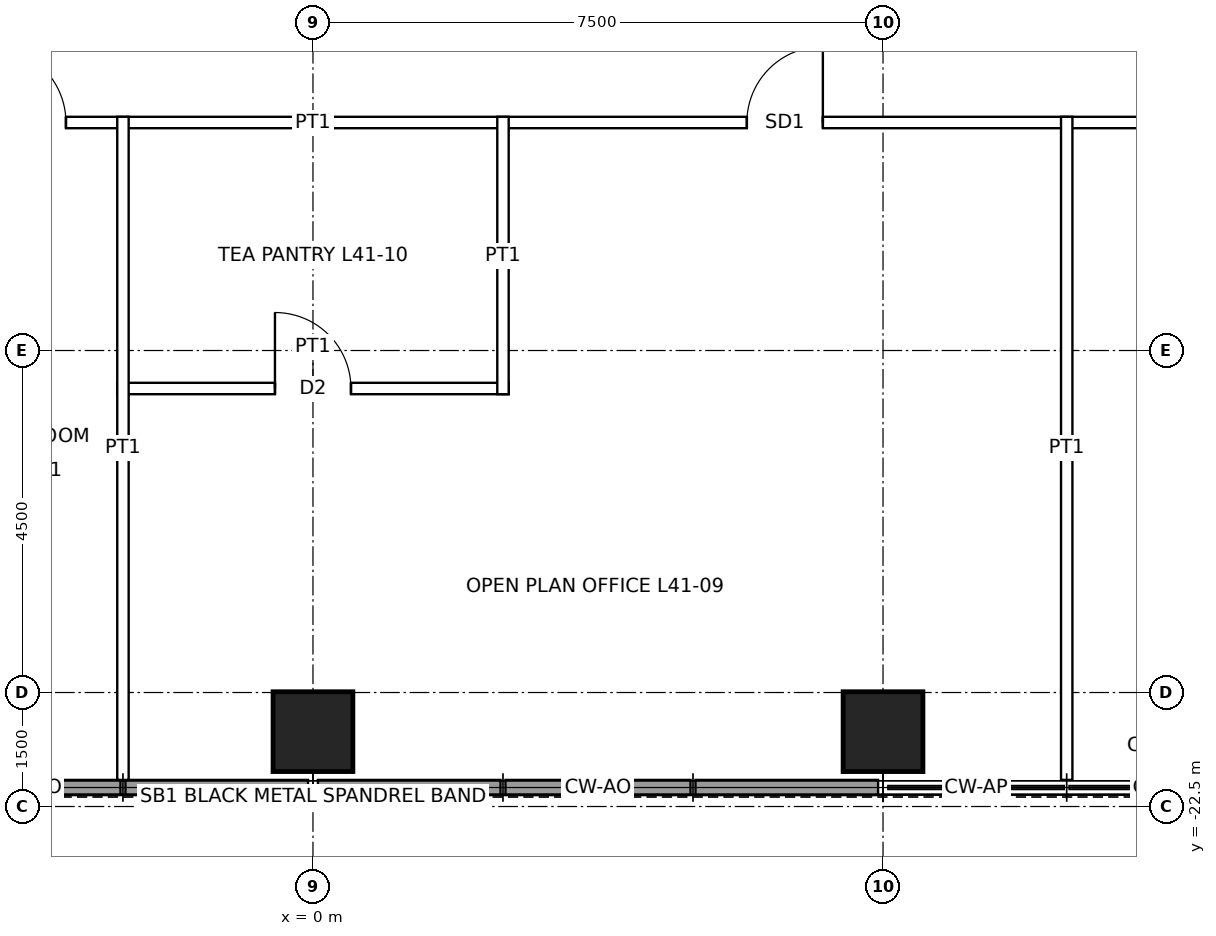
"""IFC4 building model, lengths in metres.
Left out: names, types, materials, properties, quantities, classifications, styles, units other than length and angle.
Written with IfcOpenShell. Run it as: python <this file> out.ifc"""

import sys

from ifc_helpers import new_model, si_unit, direction, frame, frame_2d, origin, origin_2d, place, context, subcontext, project, spatial, rectangle, hollow_rectangle, extrude, element, fill, save


model = new_model("IFC4")
c1 = context("Model", 3, precision=1e-05, world=origin(), true_north=direction((0.0, 1.0)))
c2 = subcontext(c1, "Body", "Model", "MODEL_VIEW")
j1 = project(units=[si_unit("LENGTHUNIT", "METRE"), si_unit("PLANEANGLEUNIT", "RADIAN")], contexts=[c1])
p1 = place(None, origin())
s1 = spatial("IfcSite", under=j1, at=p1, CompositionType="ELEMENT")
p2 = place(p1, origin())
s2 = spatial("IfcBuilding", under=s1, at=p2, CompositionType="ELEMENT")
p3 = place(p2, frame((0.0, 0.0, 197.9)))
s3 = spatial("IfcBuildingStorey", under=s2, at=p3, CompositionType="ELEMENT", Elevation=197.9)
for number, where, z_axis, x_axis in (
    (1, (7.5, -21.515, 0.0), (0.0, 0.0, 1.0), (1.0, 0.0, 0.0)),
    (2, (0.0, -21.515, 0.0), (0.0, 0.0, 1.0), (1.0, 0.0, 0.0)),
):
    element("IfcColumn", number, at=place(p3, frame(where, z_axis=z_axis, x_axis=x_axis)), inside=s3, PredefinedType="COLUMN", context=c2, shape_type="SweptSolid", body=[
        extrude(hollow_rectangle(XDim=1.05, YDim=1.05, WallThickness=0.07, at=origin_2d()), origin(), (0.0, 0.0, 1.0), 4.0),
    ])
p4 = place(p3, frame((7.435, -22.25, 0.0), z_axis=(0.0, 0.0, 1.0), x_axis=(-1.0, 0.0, 0.0)))
e3 = element("IfcWall", 3, at=p4, inside=s3, PredefinedType="SOLIDWALL", context=c2, shape_type="SweptSolid", body=[
    extrude(rectangle(XDim=2.403, YDim=0.2, at=frame_2d((1.201, 0.0))), origin(), (0.0, 0.0, 1.0), 3.85),
])
p5 = place(p3, frame((4.968, -22.25, 0.0), z_axis=(0.0, 0.0, 1.0), x_axis=(-1.0, 0.0, 0.0)))
e4 = element("IfcWall", 4, at=p5, inside=s3, PredefinedType="SOLIDWALL", context=c2, shape_type="SweptSolid", body=[
    extrude(rectangle(XDim=2.435, YDim=0.2, at=frame_2d((1.218, 0.0))), origin(), (0.0, 0.0, 1.0), 3.85),
])
for number, where, z_axis, x_axis in (
    (5, (2.468, -22.25, 0.0), (0.0, 0.0, 1.0), (-1.0, 0.0, 0.0)),
    (6, (-0.065, -22.25, 0.0), (0.0, 0.0, 1.0), (-1.0, 0.0, 0.0)),
):
    element("IfcWall", number, at=place(p3, frame(where, z_axis=z_axis, x_axis=x_axis)), inside=s3, PredefinedType="SOLIDWALL", context=c2, shape_type="SweptSolid", body=[
        extrude(rectangle(XDim=2.403, YDim=0.2, at=frame_2d((1.201, 0.0))), origin(), (0.0, 0.0, 1.0), 3.85),
    ])
p6 = place(p3, frame((-2.532, -22.25, 0.0), z_axis=(0.0, 0.0, 1.0), x_axis=(-1.0, 0.0, 0.0)))
e7 = element("IfcWall", 7, at=p6, inside=s3, PredefinedType="SOLIDWALL", context=c2, shape_type="SweptSolid", body=[
    extrude(rectangle(XDim=2.435, YDim=0.2, at=frame_2d((1.218, 0.0))), origin(), (0.0, 0.0, 1.0), 3.85),
])
p7 = place(p3, frame((-2.575, -17.0, 0.0), z_axis=(0.0, 0.0, 1.0), x_axis=(1.0, 0.0, 0.0)))
e8 = element("IfcWall", 8, at=p7, inside=s3, PredefinedType="PARTITIONING", context=c2, shape_type="SweptSolid", body=[
    extrude(rectangle(XDim=5.15, YDim=0.15, at=frame_2d((2.575, 0.0))), origin(), (0.0, 0.0, 1.0), 3.85),
])
p8 = place(p7, frame((2.075, 0.0, 0.0)))
e9 = element("IfcOpeningElement", 9, at=p8, cuts=e8, PredefinedType="OPENING", context=c2, shape_type="SweptSolid", body=[
    extrude(rectangle(XDim=1.0, YDim=2.1, at=frame_2d((0.5, 1.05))), frame((0.0, 0.085, 0.0), z_axis=(0.0, -1.0, 0.0), x_axis=(1.0, 0.0, 0.0)), (0.0, 0.0, 1.0), 0.17),
])
p9 = place(p3, frame((-13.575, -13.5, 0.0), z_axis=(0.0, 0.0, 1.0), x_axis=(1.0, 0.0, 0.0)))
e10 = element("IfcWall", 10, at=p9, inside=s3, PredefinedType="PARTITIONING", context=c2, shape_type="SweptSolid", body=[
    extrude(rectangle(XDim=27.15, YDim=0.15, at=frame_2d((13.575, 0.0))), origin(), (0.0, 0.0, 1.0), 3.85),
])
p10 = place(p9, frame((19.283, 0.0, 0.0)))
e11 = element("IfcOpeningElement", 11, at=p10, cuts=e10, PredefinedType="OPENING", context=c2, shape_type="SweptSolid", body=[
    extrude(rectangle(XDim=1.0, YDim=2.4, at=frame_2d((0.5, 1.2))), frame((0.0, 0.085, 0.0), z_axis=(0.0, -1.0, 0.0), x_axis=(1.0, 0.0, 0.0)), (0.0, 0.0, 1.0), 0.17),
])
p11 = place(p9, frame((9.325, 0.0, 0.0)))
e12 = element("IfcOpeningElement", 12, at=p11, cuts=e10, PredefinedType="OPENING", context=c2, shape_type="SweptSolid", body=[
    extrude(rectangle(XDim=1.0, YDim=2.1, at=frame_2d((0.5, 1.05))), frame((0.0, 0.085, 0.0), z_axis=(0.0, -1.0, 0.0), x_axis=(1.0, 0.0, 0.0)), (0.0, 0.0, 1.0), 0.17),
])
p12 = place(p9, frame((3.825, 0.0, 0.0)))
e13 = element("IfcOpeningElement", 13, at=p12, cuts=e10, PredefinedType="OPENING", context=c2, shape_type="SweptSolid", body=[
    extrude(rectangle(XDim=1.0, YDim=2.4, at=frame_2d((0.5, 1.2))), frame((0.0, 0.085, 0.0), z_axis=(0.0, -1.0, 0.0), x_axis=(1.0, 0.0, 0.0)), (0.0, 0.0, 1.0), 0.17),
])
p13 = place(p9, frame((25.318, 0.0, 0.0)))
e14 = element("IfcOpeningElement", 14, at=p13, cuts=e10, PredefinedType="OPENING", context=c2, shape_type="SweptSolid", body=[
    extrude(rectangle(XDim=1.0, YDim=2.4, at=frame_2d((0.5, 1.2))), frame((0.0, 0.085, 0.0), z_axis=(0.0, -1.0, 0.0), x_axis=(1.0, 0.0, 0.0)), (0.0, 0.0, 1.0), 0.17),
])
p14 = place(p3, frame((-2.5, -22.15, 0.0), z_axis=(0.0, 0.0, 1.0), x_axis=(0.0, 1.0, 0.0)))
e15 = element("IfcWall", 15, at=p14, inside=s3, PredefinedType="PARTITIONING", context=c2, shape_type="SweptSolid", body=[
    extrude(rectangle(XDim=8.725, YDim=0.15, at=frame_2d((4.362, 0.0))), origin(), (0.0, 0.0, 1.0), 3.85),
])
p15 = place(p3, frame((2.5, -17.075, 0.0), z_axis=(0.0, 0.0, 1.0), x_axis=(0.0, 1.0, 0.0)))
e16 = element("IfcWall", 16, at=p15, inside=s3, PredefinedType="PARTITIONING", context=c2, shape_type="SweptSolid", body=[
    extrude(rectangle(XDim=3.65, YDim=0.15, at=frame_2d((1.825, 0.0))), origin(), (0.0, 0.0, 1.0), 3.85),
])
p16 = place(p3, frame((9.917, -22.15, 0.0), z_axis=(0.0, 0.0, 1.0), x_axis=(0.0, 1.0, 0.0)))
e17 = element("IfcWall", 17, at=p16, inside=s3, PredefinedType="PARTITIONING", context=c2, shape_type="SweptSolid", body=[
    extrude(rectangle(XDim=8.725, YDim=0.15, at=frame_2d((4.362, 0.0))), origin(), (0.0, 0.0, 1.0), 3.85),
])
p17 = place(p10, origin())
e18 = element("IfcDoor", 18, at=p17, inside=s3, OperationType="SINGLE_SWING_RIGHT", PredefinedType="DOOR", context=c2, shape_type="SweptSolid", body=[
    extrude(rectangle(XDim=1.0, YDim=2.4, at=frame_2d((0.5, 1.2))), frame((0.0, 0.025, 0.0), z_axis=(0.0, -1.0, 0.0), x_axis=(1.0, 0.0, 0.0)), (0.0, 0.0, 1.0), 0.05),
])
fill(e11, e18)
p18 = place(p8, origin())
e19 = element("IfcDoor", 19, at=p18, inside=s3, OperationType="SINGLE_SWING_LEFT", PredefinedType="DOOR", context=c2, shape_type="SweptSolid", body=[
    extrude(rectangle(XDim=1.0, YDim=2.1, at=frame_2d((0.5, 1.05))), frame((0.0, 0.025, 0.0), z_axis=(0.0, -1.0, 0.0), x_axis=(1.0, 0.0, 0.0)), (0.0, 0.0, 1.0), 0.05),
])
fill(e9, e19)
p19 = place(p11, origin())
e20 = element("IfcDoor", 20, at=p19, inside=s3, OperationType="SINGLE_SWING_LEFT", PredefinedType="DOOR", context=c2, shape_type="SweptSolid", body=[
    extrude(rectangle(XDim=1.0, YDim=2.1, at=frame_2d((0.5, 1.05))), frame((0.0, 0.025, 0.0), z_axis=(0.0, -1.0, 0.0), x_axis=(1.0, 0.0, 0.0)), (0.0, 0.0, 1.0), 0.05),
])
fill(e12, e20)
save(model, sys.argv[1])
